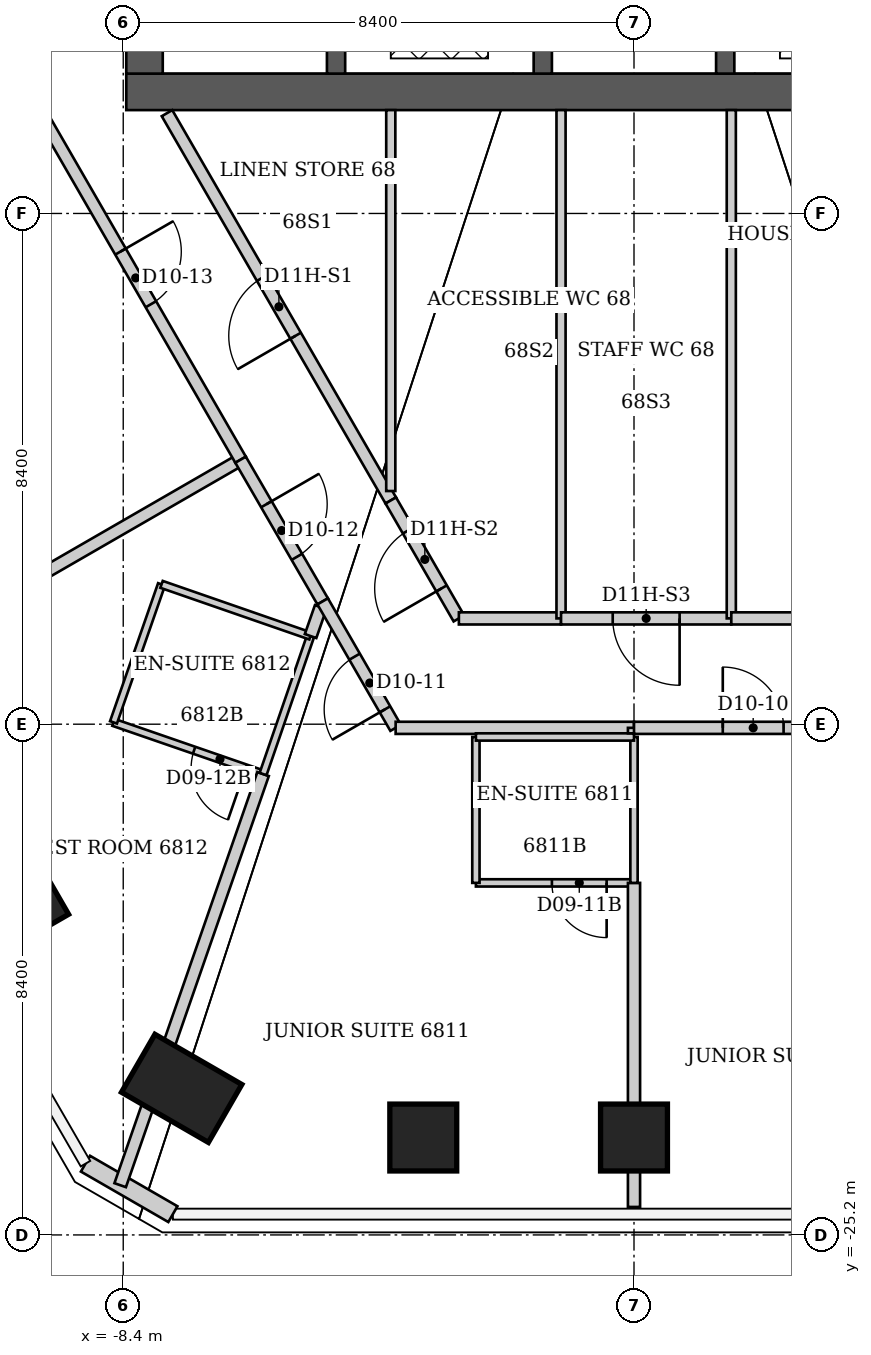
"""IFC4 building model, lengths in metres.
Left out: names, types, materials, properties, quantities, classifications, styles, units other than length and angle.
Written with IfcOpenShell. Run it as: python <this file> out.ifc"""

import sys

from ifc_helpers import new_model, si_unit, direction, frame, frame_2d, origin, origin_2d, place, context, subcontext, project, spatial, rectangle, extrude, element, fill, save


model = new_model("IFC4")
c1 = context("Model", 3, precision=1e-05, world=origin(), true_north=direction((0.0, 1.0)))
c2 = subcontext(c1, "Body", "Model", "MODEL_VIEW")
j1 = project(units=[si_unit("LENGTHUNIT", "METRE"), si_unit("PLANEANGLEUNIT", "RADIAN")], contexts=[c1])
p1 = place(None, origin())
s1 = spatial("IfcSite", under=j1, at=p1, CompositionType="ELEMENT")
p2 = place(p1, origin())
s2 = spatial("IfcBuilding", under=s1, at=p2, CompositionType="ELEMENT")
p3 = place(p2, frame((0.0, 0.0, 272.2)))
s3 = spatial("IfcBuildingStorey", under=s2, at=p3, CompositionType="ELEMENT", Elevation=272.2)
for number, where, z_axis, x_axis in (
    (1, (0.0, -23.598, 0.0), (0.0, 0.0, 1.0), (0.0, -1.0, 0.0)),
    (2, (-3.466, -23.598, 0.0), (0.0, 0.0, 1.0), (0.0, -1.0, 0.0)),
):
    element("IfcColumn", number, at=place(p3, frame(where, z_axis=z_axis, x_axis=x_axis)), inside=s3, PredefinedType="COLUMN", context=c2, shape_type="SweptSolid", body=[
        extrude(rectangle(XDim=1.1, YDim=1.1, at=origin_2d()), origin(), (0.0, 0.0, 1.0), 3.8),
    ])
p4 = place(p3, frame((-7.439, -22.79, 0.0), z_axis=(0.0, 0.0, 1.0), x_axis=(-0.5, -0.866025403784, 0.0)))
e3 = element("IfcColumn", 3, at=p4, inside=s3, PredefinedType="COLUMN", context=c2, shape_type="SweptSolid", body=[
    extrude(rectangle(XDim=1.1, YDim=1.65, at=origin_2d()), origin(), (0.0, 0.0, 1.0), 3.8),
])
p5 = place(p3, frame((-10.05, -19.725, 0.0), z_axis=(0.0, 0.0, 1.0), x_axis=(-0.866025403784, -0.5, 0.0)))
e4 = element("IfcColumn", 4, at=p5, inside=s3, PredefinedType="COLUMN", context=c2, shape_type="SweptSolid", body=[
    extrude(rectangle(XDim=1.1, YDim=1.1, at=origin_2d()), origin(), (0.0, 0.0, 1.0), 3.8),
])
p6 = place(p3, frame((-8.35, -6.4, 0.0), z_axis=(0.0, 0.0, 1.0), x_axis=(1.0, 0.0, 0.0)))
e5 = element("IfcWall", 5, at=p6, inside=s3, PredefinedType="SHEAR", context=c2, shape_type="SweptSolid", body=[
    extrude(rectangle(XDim=16.7, YDim=0.6, at=frame_2d((8.35, 0.0))), origin(), (0.0, 0.0, 1.0), 3.8),
])
p7 = place(p3, frame((-8.05, -6.1, 0.0), z_axis=(0.0, 0.0, 1.0), x_axis=(0.0, 1.0, 0.0)))
e6 = element("IfcWall", 6, at=p7, inside=s3, PredefinedType="SHEAR", context=c2, shape_type="SweptSolid", body=[
    extrude(rectangle(XDim=12.2, YDim=0.6, at=frame_2d((6.1, 0.0))), origin(), (0.0, 0.0, 1.0), 3.8),
])
p8 = place(p7, frame((7.6, 0.0, 0.0)))
e7 = element("IfcOpeningElement", 7, at=p8, cuts=e6, PredefinedType="OPENING", context=c2, shape_type="SweptSolid", body=[
    extrude(rectangle(XDim=1.2, YDim=2.2, at=frame_2d((0.6, 1.1))), frame((0.0, 0.3, 0.0), z_axis=(0.0, -1.0, 0.0), x_axis=(1.0, 0.0, 0.0)), (0.0, 0.0, 1.0), 0.6),
])
for number, where, z_axis, x_axis in (
    (8, (-4.9, -6.1, 0.0), (0.0, 0.0, 1.0), (0.0, 1.0, 0.0)),
    (9, (-1.5, -6.1, 0.0), (0.0, 0.0, 1.0), (0.0, 1.0, 0.0)),
    (10, (1.5, -6.1, 0.0), (0.0, 0.0, 1.0), (0.0, 1.0, 0.0)),
):
    element("IfcWall", number, at=place(p3, frame(where, z_axis=z_axis, x_axis=x_axis)), inside=s3, PredefinedType="SHEAR", context=c2, shape_type="SweptSolid", body=[
        extrude(rectangle(XDim=7.2, YDim=0.3, at=frame_2d((3.6, 0.0))), origin(), (0.0, 0.0, 1.0), 3.8),
    ])
p9 = place(p3, frame((-7.583, -24.858, 0.0), z_axis=(0.0, 0.0, 1.0), x_axis=(-0.865989634427, 0.500061949227, 0.0)))
e11 = element("IfcWall", 11, at=p9, inside=s3, PredefinedType="SOLIDWALL", context=c2, shape_type="SweptSolid", body=[
    extrude(rectangle(XDim=1.66, YDim=0.3, at=frame_2d((0.83, 0.0))), origin(), (0.0, 0.0, 1.0), 3.64),
])
p10 = place(p3, frame((-13.374, -16.435, 0.0), z_axis=(0.0, 0.0, 1.0), x_axis=(0.866082379937, 0.499901301422, 0.0)))
e12 = element("IfcWall", 12, at=p10, inside=s3, PredefinedType="PARTITIONING", context=c2, shape_type="SweptSolid", body=[
    extrude(rectangle(XDim=7.957, YDim=0.2, at=frame_2d((3.978, 0.0))), origin(), (0.0, 0.0, 1.0), 3.64),
])
p11 = place(p3, frame((-9.92, -6.47, 0.0), z_axis=(0.0, 0.0, 1.0), x_axis=(0.499718371597, -0.866187940974, 0.0)))
e13 = element("IfcWall", 13, at=p11, inside=s3, PredefinedType="PARTITIONING", context=c2, shape_type="SweptSolid", body=[
    extrude(rectangle(XDim=6.904, YDim=0.2, at=frame_2d((3.452, 0.0))), origin(), (0.0, 0.0, 1.0), 3.64),
])
p12 = place(p11, frame((2.952, 0.0, 0.0)))
e14 = element("IfcOpeningElement", 14, at=p12, cuts=e13, PredefinedType="OPENING", context=c2, shape_type="SweptSolid", body=[
    extrude(rectangle(XDim=1.0, YDim=2.13, at=frame_2d((0.5, 1.065))), frame((0.0, 0.1, 0.0), z_axis=(0.0, -1.0, 0.0), x_axis=(1.0, 0.0, 0.0)), (0.0, 0.0, 1.0), 0.2),
])
p13 = place(p3, frame((-8.56, -16.77, 0.0), z_axis=(0.0, 0.0, 1.0), x_axis=(0.94515546045, -0.326620813149, 0.0)))
e15 = element("IfcWall", 15, at=p13, inside=s3, PredefinedType="PARTITIONING", context=c2, shape_type="SweptSolid", body=[
    extrude(rectangle(XDim=2.603, YDim=0.12, at=frame_2d((1.301, 0.0))), origin(), (0.0, 0.0, 1.0), 3.64),
])
p14 = place(p13, frame((1.403, 0.0, 0.0)))
e16 = element("IfcOpeningElement", 16, at=p14, cuts=e15, PredefinedType="OPENING", context=c2, shape_type="SweptSolid", body=[
    extrude(rectangle(XDim=0.9, YDim=2.03, at=frame_2d((0.45, 1.015))), frame((0.0, 0.06, 0.0), z_axis=(0.0, -1.0, 0.0), x_axis=(1.0, 0.0, 0.0)), (0.0, 0.0, 1.0), 0.12),
])
p15 = place(p3, frame((-8.45, -24.382, 0.0), z_axis=(0.0, 0.0, 1.0), x_axis=(0.328306316797, 0.944571311417, 0.0)))
e17 = element("IfcWall", 17, at=p15, inside=s3, PredefinedType="PARTITIONING", context=c2, shape_type="SweptSolid", body=[
    extrude(rectangle(XDim=7.158, YDim=0.2, at=frame_2d((3.579, 0.0))), origin(), (0.0, 0.0, 1.0), 3.64),
])
p16 = place(p3, frame((-7.77, -14.5, 0.0), z_axis=(0.0, 0.0, 1.0), x_axis=(-0.328693963496, -0.944436487203, 0.0)))
e18 = element("IfcWall", 18, at=p16, inside=s3, PredefinedType="PARTITIONING", context=c2, shape_type="SweptSolid", body=[
    extrude(rectangle(XDim=2.404, YDim=0.12, at=frame_2d((1.202, 0.0))), origin(), (0.0, 0.0, 1.0), 3.64),
])
p17 = place(p3, frame((-6.47, -12.45, 0.0), z_axis=(0.0, 0.0, 1.0), x_axis=(0.501275699481, -0.865287624498, 0.0)))
e19 = element("IfcWall", 19, at=p17, inside=s3, PredefinedType="PARTITIONING", context=c2, shape_type="SweptSolid", body=[
    extrude(rectangle(XDim=2.693, YDim=0.2, at=frame_2d((1.346, 0.0))), origin(), (0.0, 0.0, 1.0), 3.64),
])
p18 = place(p17, frame((0.846, 0.0, 0.0)))
e20 = element("IfcOpeningElement", 20, at=p18, cuts=e19, PredefinedType="OPENING", context=c2, shape_type="SweptSolid", body=[
    extrude(rectangle(XDim=1.0, YDim=2.13, at=frame_2d((0.5, 1.065))), frame((0.0, 0.1, 0.0), z_axis=(0.0, -1.0, 0.0), x_axis=(1.0, 0.0, 0.0)), (0.0, 0.0, 1.0), 0.2),
])
p19 = place(p3, frame((-6.1, -17.62, 0.0), z_axis=(0.0, 0.0, 1.0), x_axis=(0.325457785204, 0.945556571576, 0.0)))
e21 = element("IfcWall", 21, at=p19, inside=s3, PredefinedType="PARTITIONING", context=c2, shape_type="SweptSolid", body=[
    extrude(rectangle(XDim=2.4, YDim=0.12, at=frame_2d((1.2, 0.0))), origin(), (0.0, 0.0, 1.0), 3.64),
])
p20 = place(p3, frame((-5.32, -15.35, 0.0), z_axis=(0.0, 0.0, 1.0), x_axis=(-0.944742926852, 0.327812144624, 0.0)))
e22 = element("IfcWall", 22, at=p20, inside=s3, PredefinedType="PARTITIONING", context=c2, shape_type="SweptSolid", body=[
    extrude(rectangle(XDim=2.593, YDim=0.12, at=frame_2d((1.297, 0.0))), origin(), (0.0, 0.0, 1.0), 3.64),
])
p21 = place(p3, frame((-5.319, -15.35, 0.0), z_axis=(0.0, 0.0, 1.0), x_axis=(0.329422375526, 0.944182661619, 0.0)))
e23 = element("IfcWall", 23, at=p21, inside=s3, PredefinedType="PARTITIONING", context=c2, shape_type="SweptSolid", body=[
    extrude(rectangle(XDim=0.504, YDim=0.2, at=frame_2d((0.252, 0.0))), origin(), (0.0, 0.0, 1.0), 3.64),
])
p22 = place(p3, frame((-5.12, -14.78, 0.0), z_axis=(0.0, 0.0, 1.0), x_axis=(0.499813401482, -0.866133109688, 0.0)))
e24 = element("IfcWall", 24, at=p22, inside=s3, PredefinedType="PARTITIONING", context=c2, shape_type="SweptSolid", body=[
    extrude(rectangle(XDim=2.401, YDim=0.2, at=frame_2d((1.201, 0.0))), origin(), (0.0, 0.0, 1.0), 3.64),
])
p23 = place(p22, frame((1.05, 0.0, 0.0)))
e25 = element("IfcOpeningElement", 25, at=p23, cuts=e24, PredefinedType="OPENING", context=c2, shape_type="SweptSolid", body=[
    extrude(rectangle(XDim=1.0, YDim=2.13, at=frame_2d((0.5, 1.065))), frame((0.0, 0.1, 0.0), z_axis=(0.0, -1.0, 0.0), x_axis=(1.0, 0.0, 0.0)), (0.0, 0.0, 1.0), 0.2),
])
p24 = place(p3, frame((-4.0, -13.12, 0.0), z_axis=(0.0, 0.0, 1.0), x_axis=(-0.500218436225, 0.865899252835, 0.0)))
e26 = element("IfcWall", 26, at=p24, inside=s3, PredefinedType="PARTITIONING", context=c2, shape_type="SweptSolid", body=[
    extrude(rectangle(XDim=7.357, YDim=0.2, at=frame_2d((3.678, 0.0))), origin(), (0.0, 0.0, 1.0), 3.64),
])
p25 = place(p24, frame((3.128, 0.0, 0.0)))
e27 = element("IfcOpeningElement", 27, at=p25, cuts=e26, PredefinedType="OPENING", context=c2, shape_type="SweptSolid", body=[
    extrude(rectangle(XDim=1.1, YDim=2.2, at=frame_2d((0.55, 1.1))), frame((0.0, 0.1, 0.0), z_axis=(0.0, -1.0, 0.0), x_axis=(1.0, 0.0, 0.0)), (0.0, 0.0, 1.0), 0.2),
])
p26 = place(p3, frame((-4.0, -6.7, 0.0), z_axis=(0.0, 0.0, 1.0), x_axis=(0.0, -1.0, 0.0)))
e28 = element("IfcWall", 28, at=p26, inside=s3, PredefinedType="PARTITIONING", context=c2, shape_type="SweptSolid", body=[
    extrude(rectangle(XDim=6.265, YDim=0.15, at=frame_2d((3.133, 0.0))), origin(), (0.0, 0.0, 1.0), 3.64),
])
p27 = place(p3, frame((-3.92, -16.86, 0.0), z_axis=(0.0, 0.0, 1.0), x_axis=(1.0, 0.0, 0.0)))
e29 = element("IfcWall", 29, at=p27, inside=s3, PredefinedType="PARTITIONING", context=c2, shape_type="SweptSolid", body=[
    extrude(rectangle(XDim=3.92, YDim=0.2, at=frame_2d((1.96, 0.0))), origin(), (0.0, 0.0, 1.0), 3.64),
])
p28 = place(p3, frame((-2.88, -15.06, 0.0), z_axis=(0.0, 0.0, 1.0), x_axis=(-0.499983441833, 0.866034963436, 0.0)))
e30 = element("IfcWall", 30, at=p28, inside=s3, PredefinedType="PARTITIONING", context=c2, shape_type="SweptSolid", body=[
    extrude(rectangle(XDim=2.24, YDim=0.2, at=frame_2d((1.12, 0.0))), origin(), (0.0, 0.0, 1.0), 3.64),
])
p29 = place(p28, frame((0.57, 0.0, 0.0)))
e31 = element("IfcOpeningElement", 31, at=p29, cuts=e30, PredefinedType="OPENING", context=c2, shape_type="SweptSolid", body=[
    extrude(rectangle(XDim=1.1, YDim=2.2, at=frame_2d((0.55, 1.1))), frame((0.0, 0.1, 0.0), z_axis=(0.0, -1.0, 0.0), x_axis=(1.0, 0.0, 0.0)), (0.0, 0.0, 1.0), 0.2),
])
p30 = place(p3, frame((-2.6, -19.41, 0.0), z_axis=(0.0, 0.0, 1.0), x_axis=(1.0, 0.0, 0.0)))
e32 = element("IfcWall", 32, at=p30, inside=s3, PredefinedType="PARTITIONING", context=c2, shape_type="SweptSolid", body=[
    extrude(rectangle(XDim=2.6, YDim=0.12, at=frame_2d((1.3, 0.0))), origin(), (0.0, 0.0, 1.0), 3.64),
])
p31 = place(p30, frame((1.25, 0.0, 0.0)))
e33 = element("IfcOpeningElement", 33, at=p31, cuts=e32, PredefinedType="OPENING", context=c2, shape_type="SweptSolid", body=[
    extrude(rectangle(XDim=0.9, YDim=2.03, at=frame_2d((0.45, 1.015))), frame((0.0, 0.06, 0.0), z_axis=(0.0, -1.0, 0.0), x_axis=(1.0, 0.0, 0.0)), (0.0, 0.0, 1.0), 0.12),
])
p32 = place(p3, frame((-2.6, -17.01, 0.0), z_axis=(0.0, 0.0, 1.0), x_axis=(0.0, -1.0, 0.0)))
e34 = element("IfcWall", 34, at=p32, inside=s3, PredefinedType="PARTITIONING", context=c2, shape_type="SweptSolid", body=[
    extrude(rectangle(XDim=2.4, YDim=0.12, at=frame_2d((1.2, 0.0))), origin(), (0.0, 0.0, 1.0), 3.64),
])
p33 = place(p3, frame((-1.2, -15.06, 0.0), z_axis=(0.0, 0.0, 1.0), x_axis=(-1.0, 0.0, 0.0)))
e35 = element("IfcWall", 35, at=p33, inside=s3, PredefinedType="PARTITIONING", context=c2, shape_type="SweptSolid", body=[
    extrude(rectangle(XDim=1.68, YDim=0.2, at=frame_2d((0.84, 0.0))), origin(), (0.0, 0.0, 1.0), 3.64),
])
p34 = place(p3, frame((-1.2, -6.7, 0.0), z_axis=(0.0, 0.0, 1.0), x_axis=(0.0, -1.0, 0.0)))
e36 = element("IfcWall", 36, at=p34, inside=s3, PredefinedType="PARTITIONING", context=c2, shape_type="SweptSolid", body=[
    extrude(rectangle(XDim=8.36, YDim=0.15, at=frame_2d((4.18, 0.0))), origin(), (0.0, 0.0, 1.0), 3.64),
])
p35 = place(p3, frame((0.0, -24.74, 0.0), z_axis=(0.0, 0.0, 1.0), x_axis=(0.0, 1.0, 0.0)))
e37 = element("IfcWall", 37, at=p35, inside=s3, PredefinedType="PARTITIONING", context=c2, shape_type="SweptSolid", body=[
    extrude(rectangle(XDim=5.33, YDim=0.2, at=frame_2d((2.665, 0.0))), origin(), (0.0, 0.0, 1.0), 2.86),
])
p36 = place(p3, frame((0.0, -19.41, 0.0), z_axis=(0.0, 0.0, 1.0), x_axis=(0.0, 1.0, 0.0)))
e38 = element("IfcWall", 38, at=p36, inside=s3, PredefinedType="PARTITIONING", context=c2, shape_type="SweptSolid", body=[
    extrude(rectangle(XDim=2.4, YDim=0.12, at=frame_2d((1.2, 0.0))), origin(), (0.0, 0.0, 1.0), 2.86),
])
p37 = place(p3, frame((0.0, -17.01, 0.0), z_axis=(0.0, 0.0, 1.0), x_axis=(-1.0, 0.0, 0.0)))
e39 = element("IfcWall", 39, at=p37, inside=s3, PredefinedType="PARTITIONING", context=c2, shape_type="SweptSolid", body=[
    extrude(rectangle(XDim=2.6, YDim=0.12, at=frame_2d((1.3, 0.0))), origin(), (0.0, 0.0, 1.0), 3.64),
])
p38 = place(p3, frame((0.0, -16.95, 0.0), z_axis=(0.0, 0.0, 1.0), x_axis=(0.0, 1.0, 0.0)))
e40 = element("IfcWall", 40, at=p38, inside=s3, PredefinedType="PARTITIONING", context=c2, shape_type="SweptSolid", body=[
    extrude(rectangle(XDim=0.09, YDim=0.2, at=frame_2d((0.045, 0.0))), origin(), (0.0, 0.0, 1.0), 3.64),
])
p39 = place(p3, frame((0.0, -16.86, 0.0), z_axis=(0.0, 0.0, 1.0), x_axis=(1.0, 0.0, 0.0)))
e41 = element("IfcWall", 41, at=p39, inside=s3, PredefinedType="PARTITIONING", context=c2, shape_type="SweptSolid", body=[
    extrude(rectangle(XDim=3.92, YDim=0.2, at=frame_2d((1.96, 0.0))), origin(), (0.0, 0.0, 1.0), 3.64),
])
p40 = place(p39, frame((1.46, 0.0, 0.0)))
e42 = element("IfcOpeningElement", 42, at=p40, cuts=e41, PredefinedType="OPENING", context=c2, shape_type="SweptSolid", body=[
    extrude(rectangle(XDim=1.0, YDim=2.13, at=frame_2d((0.5, 1.065))), frame((0.0, 0.1, 0.0), z_axis=(0.0, -1.0, 0.0), x_axis=(1.0, 0.0, 0.0)), (0.0, 0.0, 1.0), 0.2),
])
p41 = place(p3, frame((1.6, -15.06, 0.0), z_axis=(0.0, 0.0, 1.0), x_axis=(-1.0, 0.0, 0.0)))
e43 = element("IfcWall", 43, at=p41, inside=s3, PredefinedType="PARTITIONING", context=c2, shape_type="SweptSolid", body=[
    extrude(rectangle(XDim=2.8, YDim=0.2, at=frame_2d((1.4, 0.0))), origin(), (0.0, 0.0, 1.0), 3.64),
])
p42 = place(p41, frame((0.85, 0.0, 0.0)))
e44 = element("IfcOpeningElement", 44, at=p42, cuts=e43, PredefinedType="OPENING", context=c2, shape_type="SweptSolid", body=[
    extrude(rectangle(XDim=1.1, YDim=2.2, at=frame_2d((0.55, 1.1))), frame((0.0, 0.1, 0.0), z_axis=(0.0, -1.0, 0.0), x_axis=(1.0, 0.0, 0.0)), (0.0, 0.0, 1.0), 0.2),
])
p43 = place(p3, frame((1.6, -6.7, 0.0), z_axis=(0.0, 0.0, 1.0), x_axis=(0.0, -1.0, 0.0)))
e45 = element("IfcWall", 45, at=p43, inside=s3, PredefinedType="PARTITIONING", context=c2, shape_type="SweptSolid", body=[
    extrude(rectangle(XDim=8.36, YDim=0.15, at=frame_2d((4.18, 0.0))), origin(), (0.0, 0.0, 1.0), 2.86),
])
p44 = place(p3, frame((2.88, -15.06, 0.0), z_axis=(0.0, 0.0, 1.0), x_axis=(-1.0, 0.0, 0.0)))
e46 = element("IfcWall", 46, at=p44, inside=s3, PredefinedType="PARTITIONING", context=c2, shape_type="SweptSolid", body=[
    extrude(rectangle(XDim=1.28, YDim=0.2, at=frame_2d((0.64, 0.0))), origin(), (0.0, 0.0, 1.0), 3.64),
])
p45 = place(p40, origin())
e47 = element("IfcDoor", 47, at=p45, inside=s3, OperationType="SINGLE_SWING_LEFT", PredefinedType="DOOR", context=c2, shape_type="SweptSolid", body=[
    extrude(rectangle(XDim=1.0, YDim=2.13, at=frame_2d((0.5, 1.065))), frame((0.0, 0.025, 0.0), z_axis=(0.0, -1.0, 0.0), x_axis=(1.0, 0.0, 0.0)), (0.0, 0.0, 1.0), 0.05),
])
fill(e42, e47)
p46 = place(p23, origin())
e48 = element("IfcDoor", 48, at=p46, inside=s3, OperationType="SINGLE_SWING_RIGHT", PredefinedType="DOOR", context=c2, shape_type="SweptSolid", body=[
    extrude(rectangle(XDim=1.0, YDim=2.13, at=frame_2d((0.5, 1.065))), frame((0.0, 0.025, 0.0), z_axis=(0.0, -1.0, 0.0), x_axis=(1.0, 0.0, 0.0)), (0.0, 0.0, 1.0), 0.05),
])
fill(e25, e48)
p47 = place(p31, origin())
e49 = element("IfcDoor", 49, at=p47, inside=s3, OperationType="SINGLE_SWING_RIGHT", PredefinedType="DOOR", context=c2, shape_type="SweptSolid", body=[
    extrude(rectangle(XDim=0.9, YDim=2.03, at=frame_2d((0.45, 1.015))), frame((0.0, 0.025, 0.0), z_axis=(0.0, -1.0, 0.0), x_axis=(1.0, 0.0, 0.0)), (0.0, 0.0, 1.0), 0.05),
])
fill(e33, e49)
p48 = place(p18, origin())
e50 = element("IfcDoor", 50, at=p48, inside=s3, OperationType="SINGLE_SWING_LEFT", PredefinedType="DOOR", context=c2, shape_type="SweptSolid", body=[
    extrude(rectangle(XDim=1.0, YDim=2.13, at=frame_2d((0.5, 1.065))), frame((0.0, 0.025, 0.0), z_axis=(0.0, -1.0, 0.0), x_axis=(1.0, 0.0, 0.0)), (0.0, 0.0, 1.0), 0.05),
])
fill(e20, e50)
p49 = place(p14, origin())
e51 = element("IfcDoor", 51, at=p49, inside=s3, OperationType="SINGLE_SWING_RIGHT", PredefinedType="DOOR", context=c2, shape_type="SweptSolid", body=[
    extrude(rectangle(XDim=0.9, YDim=2.03, at=frame_2d((0.45, 1.015))), frame((0.0, 0.025, 0.0), z_axis=(0.0, -1.0, 0.0), x_axis=(1.0, 0.0, 0.0)), (0.0, 0.0, 1.0), 0.05),
])
fill(e16, e51)
p50 = place(p12, origin())
e52 = element("IfcDoor", 52, at=p50, inside=s3, OperationType="SINGLE_SWING_LEFT", PredefinedType="DOOR", context=c2, shape_type="SweptSolid", body=[
    extrude(rectangle(XDim=1.0, YDim=2.13, at=frame_2d((0.5, 1.065))), frame((0.0, 0.025, 0.0), z_axis=(0.0, -1.0, 0.0), x_axis=(1.0, 0.0, 0.0)), (0.0, 0.0, 1.0), 0.05),
])
fill(e14, e52)
p51 = place(p25, origin())
e53 = element("IfcDoor", 53, at=p51, inside=s3, OperationType="SINGLE_SWING_LEFT", PredefinedType="DOOR", context=c2, shape_type="SweptSolid", body=[
    extrude(rectangle(XDim=1.1, YDim=2.2, at=frame_2d((0.55, 1.1))), frame((0.0, 0.025, 0.0), z_axis=(0.0, -1.0, 0.0), x_axis=(1.0, 0.0, 0.0)), (0.0, 0.0, 1.0), 0.05),
])
fill(e27, e53)
p52 = place(p29, origin())
e54 = element("IfcDoor", 54, at=p52, inside=s3, OperationType="SINGLE_SWING_LEFT", PredefinedType="DOOR", context=c2, shape_type="SweptSolid", body=[
    extrude(rectangle(XDim=1.1, YDim=2.2, at=frame_2d((0.55, 1.1))), frame((0.0, 0.025, 0.0), z_axis=(0.0, -1.0, 0.0), x_axis=(1.0, 0.0, 0.0)), (0.0, 0.0, 1.0), 0.05),
])
fill(e31, e54)
p53 = place(p42, origin())
e55 = element("IfcDoor", 55, at=p53, inside=s3, OperationType="SINGLE_SWING_LEFT", PredefinedType="DOOR", context=c2, shape_type="SweptSolid", body=[
    extrude(rectangle(XDim=1.1, YDim=2.2, at=frame_2d((0.55, 1.1))), frame((0.0, 0.025, 0.0), z_axis=(0.0, -1.0, 0.0), x_axis=(1.0, 0.0, 0.0)), (0.0, 0.0, 1.0), 0.05),
])
fill(e44, e55)
save(model, sys.argv[1])
